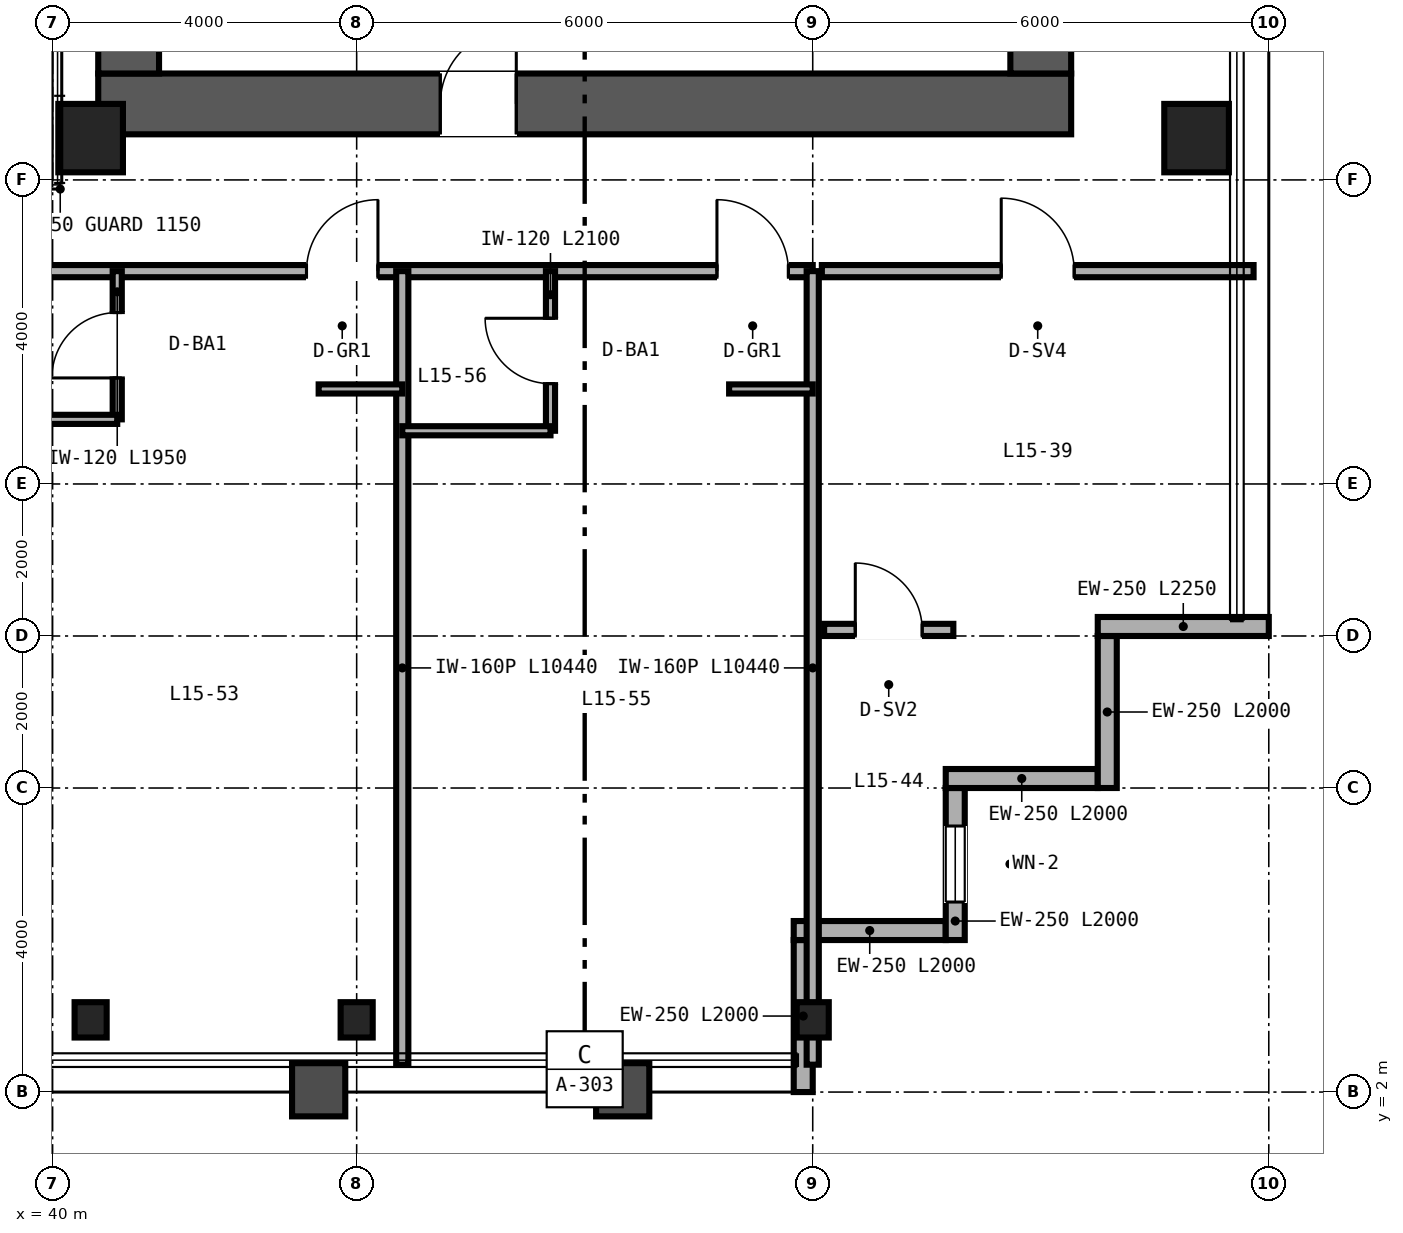
"""IFC4 building model, lengths in metres.
Left out: names, types, materials, properties, quantities, classifications, styles, units other than length and angle.
Written with IfcOpenShell. Run it as: python <this file> out.ifc"""

import sys

from ifc_helpers import new_model, si_unit, direction, frame, frame_2d, origin, origin_2d, place, context, subcontext, project, spatial, rectangle, hollow_rectangle, i_section, extrude, source, transform, mapped, element, fill, save


model = new_model("IFC4")
c1 = context("Model", 3, precision=1e-05, world=origin(), true_north=direction((0.0, 1.0)))
c2 = subcontext(c1, "Body", "Model", "MODEL_VIEW")
j1 = project(units=[si_unit("LENGTHUNIT", "METRE"), si_unit("PLANEANGLEUNIT", "RADIAN")], contexts=[c1])
p1 = place(None, origin())
s1 = spatial("IfcSite", under=j1, at=p1, CompositionType="ELEMENT")
p2 = place(p1, origin())
s2 = spatial("IfcBuilding", under=s1, at=p2, CompositionType="ELEMENT")
p3 = place(p2, frame((0.0, 0.0, 63.6)))
s3 = spatial("IfcBuildingStorey", under=s2, at=p3, CompositionType="ELEMENT", Elevation=63.6)
p4 = place(p3, frame((40.6, 15.0, 0.0), z_axis=(0.0, 0.0, 1.0), x_axis=(1.0, 0.0, 0.0)))
e1 = element("IfcWall", 1, at=p4, inside=s3, PredefinedType="SHEAR", context=c2, shape_type="SweptSolid", body=[
    extrude(rectangle(XDim=12.8, YDim=0.8, at=frame_2d((6.4, 0.0))), origin(), (0.0, 0.0, 1.0), 3.35),
])
p5 = place(p4, frame((4.5, 0.0, 0.0)))
e2 = element("IfcOpeningElement", 2, at=p5, cuts=e1, PredefinedType="OPENING", context=c2, shape_type="SweptSolid", body=[
    extrude(rectangle(XDim=1.0, YDim=2.15, at=frame_2d((0.5, 1.075))), frame((0.0, 0.41, 0.0), z_axis=(0.0, -1.0, 0.0), x_axis=(1.0, 0.0, 0.0)), (0.0, 0.0, 1.0), 0.82),
])
for number, where, z_axis, x_axis in (
    (3, (41.0, 15.4, 0.0), (0.0, 0.0, 1.0), (0.0, 1.0, 0.0)),
    (4, (53.0, 15.4, 0.0), (0.0, 0.0, 1.0), (0.0, 1.0, 0.0)),
):
    element("IfcWall", number, at=place(p3, frame(where, z_axis=z_axis, x_axis=x_axis)), inside=s3, PredefinedType="SHEAR", context=c2, shape_type="SweptSolid", body=[
        extrude(rectangle(XDim=21.2, YDim=0.8, at=frame_2d((10.6, 0.0))), origin(), (0.0, 0.0, 1.0), 3.35),
    ])
m1 = source(origin(), c2, "Body", "SweptSolid", [
    extrude(hollow_rectangle(XDim=0.85, YDim=0.9, WallThickness=0.04, at=origin_2d()), origin(), (0.0, 0.0, 1.0), 3.35),
])
for number, where, z_axis, x_axis in (
    (5, (40.5, 14.55, 0.0), (0.0, 0.0, 1.0), (1.0, 0.0, 0.0)),
    (6, (55.05, 14.55, 0.0), (0.0, 0.0, 1.0), (1.0, 0.0, 0.0)),
):
    element("IfcColumn", number, at=place(p3, frame(where, z_axis=z_axis, x_axis=x_axis)), inside=s3, PredefinedType="COLUMN", context=c2, shape_type="MappedRepresentation", body=[
        mapped(m1, transform((0.0, 0.0, 0.0), scale=1.0)),
    ])
m2 = source(origin(), c2, "Body", "SweptSolid", [
    extrude(i_section(OverallWidth=0.422, OverallDepth=0.465, WebThickness=0.045, FlangeThickness=0.073, FilletRadius=0.025, at=origin_2d()), origin(), (0.0, 0.0, 1.0), 3.35),
])
for number, where, z_axis, x_axis in (
    (7, (40.5, 2.95, 0.0), (0.0, 0.0, 1.0), (1.0, 0.0, 0.0)),
    (8, (44.0, 2.95, 0.0), (0.0, 0.0, 1.0), (1.0, 0.0, 0.0)),
    (9, (50.0, 2.95, 0.0), (0.0, 0.0, 1.0), (1.0, 0.0, 0.0)),
):
    element("IfcColumn", number, at=place(p3, frame(where, z_axis=z_axis, x_axis=x_axis)), inside=s3, PredefinedType="COLUMN", context=c2, shape_type="MappedRepresentation", body=[
        mapped(m2, transform((0.0, 0.0, 0.0), scale=1.0)),
    ])
p6 = place(p3, frame((49.875, 2.0, 0.0), z_axis=(0.0, 0.0, 1.0), x_axis=(0.0, 1.0, 0.0)))
e10 = element("IfcWall", 10, at=p6, inside=s3, PredefinedType="SOLIDWALL", context=c2, shape_type="SweptSolid", body=[
    extrude(rectangle(XDim=2.0, YDim=0.25, at=frame_2d((1.0, 0.0))), origin(), (0.0, 0.0, 1.0), 2.657),
])
p7 = place(p3, frame((49.75, 4.125, 0.0), z_axis=(0.0, 0.0, 1.0), x_axis=(1.0, 0.0, 0.0)))
e11 = element("IfcWall", 11, at=p7, inside=s3, PredefinedType="SOLIDWALL", context=c2, shape_type="SweptSolid", body=[
    extrude(rectangle(XDim=2.0, YDim=0.25, at=frame_2d((1.0, 0.0))), origin(), (0.0, 0.0, 1.0), 3.35),
])
p8 = place(p3, frame((51.875, 4.0, 0.0), z_axis=(0.0, 0.0, 1.0), x_axis=(0.0, 1.0, 0.0)))
e12 = element("IfcWall", 12, at=p8, inside=s3, PredefinedType="SOLIDWALL", context=c2, shape_type="SweptSolid", body=[
    extrude(rectangle(XDim=2.0, YDim=0.25, at=frame_2d((1.0, 0.0))), origin(), (0.0, 0.0, 1.0), 3.35),
])
p9 = place(p8, frame((0.5, 0.0, 0.85)))
e13 = element("IfcOpeningElement", 13, at=p9, cuts=e12, PredefinedType="OPENING", context=c2, shape_type="SweptSolid", body=[
    extrude(rectangle(XDim=1.0, YDim=1.9, at=frame_2d((0.5, 0.95))), frame((0.0, 0.135, 0.0), z_axis=(0.0, -1.0, 0.0), x_axis=(1.0, 0.0, 0.0)), (0.0, 0.0, 1.0), 0.27),
])
for number, where, z_axis, x_axis in (
    (14, (51.75, 6.125, 0.0), (0.0, 0.0, 1.0), (1.0, 0.0, 0.0)),
    (15, (53.875, 6.0, 0.0), (0.0, 0.0, 1.0), (0.0, 1.0, 0.0)),
):
    element("IfcWall", number, at=place(p3, frame(where, z_axis=z_axis, x_axis=x_axis)), inside=s3, PredefinedType="SOLIDWALL", context=c2, shape_type="SweptSolid", body=[
        extrude(rectangle(XDim=2.0, YDim=0.25, at=frame_2d((1.0, 0.0))), origin(), (0.0, 0.0, 1.0), 3.35),
    ])
p10 = place(p3, frame((53.75, 8.125, 0.0), z_axis=(0.0, 0.0, 1.0), x_axis=(1.0, 0.0, 0.0)))
e16 = element("IfcWall", 16, at=p10, inside=s3, PredefinedType="SOLIDWALL", context=c2, shape_type="SweptSolid", body=[
    extrude(rectangle(XDim=2.25, YDim=0.25, at=frame_2d((1.125, 0.0))), origin(), (0.0, 0.0, 1.0), 3.35),
])
p11 = place(p3, frame((50.12, 12.8, 0.0), z_axis=(0.0, 0.0, 1.0), x_axis=(1.0, 0.0, 0.0)))
e17 = element("IfcWall", 17, at=p11, inside=s3, PredefinedType="PARTITIONING", context=c2, shape_type="SweptSolid", body=[
    extrude(rectangle(XDim=5.68, YDim=0.16, at=frame_2d((2.84, 0.0))), origin(), (0.0, 0.0, 1.0), 3.35),
])
p12 = place(p11, frame((2.36, 0.0, 0.0)))
e18 = element("IfcOpeningElement", 18, at=p12, cuts=e17, PredefinedType="OPENING", context=c2, shape_type="SweptSolid", body=[
    extrude(rectangle(XDim=0.96, YDim=2.15, at=frame_2d((0.48, 1.075))), frame((0.0, 0.09, 0.0), z_axis=(0.0, -1.0, 0.0), x_axis=(1.0, 0.0, 0.0)), (0.0, 0.0, 1.0), 0.18),
])
p13 = place(p3, frame((50.15, 8.08, 0.0), z_axis=(0.0, 0.0, 1.0), x_axis=(1.0, 0.0, 0.0)))
e19 = element("IfcWall", 19, at=p13, inside=s3, PredefinedType="PARTITIONING", context=c2, shape_type="SweptSolid", body=[
    extrude(rectangle(XDim=1.7, YDim=0.16, at=frame_2d((0.85, 0.0))), origin(), (0.0, 0.0, 1.0), 3.35),
])
p14 = place(p13, frame((0.41, 0.0, 0.0)))
e20 = element("IfcOpeningElement", 20, at=p14, cuts=e19, PredefinedType="OPENING", context=c2, shape_type="SweptSolid", body=[
    extrude(rectangle(XDim=0.88, YDim=2.15, at=frame_2d((0.44, 1.075))), frame((0.0, 0.09, 0.0), z_axis=(0.0, -1.0, 0.0), x_axis=(1.0, 0.0, 0.0)), (0.0, 0.0, 1.0), 0.18),
])
p15 = place(p3, frame((14.0, 12.8, 0.0), z_axis=(0.0, 0.0, 1.0), x_axis=(1.0, 0.0, 0.0)))
e21 = element("IfcWall", 21, at=p15, inside=s3, PredefinedType="PARTITIONING", context=c2, shape_type="SweptSolid", body=[
    extrude(rectangle(XDim=36.0, YDim=0.16, at=frame_2d((18.0, 0.0))), origin(), (0.0, 0.0, 1.0), 2.571),
])
p16 = place(p15, frame((7.1, 0.0, 0.0)))
e22 = element("IfcOpeningElement", 22, at=p16, cuts=e21, PredefinedType="OPENING", context=c2, shape_type="SweptSolid", body=[
    extrude(rectangle(XDim=0.98, YDim=2.2, at=frame_2d((0.49, 1.1))), frame((0.0, 0.09, 0.0), z_axis=(0.0, -1.0, 0.0), x_axis=(1.0, 0.0, 0.0)), (0.0, 0.0, 1.0), 0.18),
])
p17 = place(p15, frame((15.5, 0.0, 0.0)))
e23 = element("IfcOpeningElement", 23, at=p17, cuts=e21, PredefinedType="OPENING", context=c2, shape_type="SweptSolid", body=[
    extrude(rectangle(XDim=0.98, YDim=2.2, at=frame_2d((0.49, 1.1))), frame((0.0, 0.09, 0.0), z_axis=(0.0, -1.0, 0.0), x_axis=(1.0, 0.0, 0.0)), (0.0, 0.0, 1.0), 0.18),
])
p18 = place(p15, frame((23.9, 0.0, 0.0)))
e24 = element("IfcOpeningElement", 24, at=p18, cuts=e21, PredefinedType="OPENING", context=c2, shape_type="SweptSolid", body=[
    extrude(rectangle(XDim=0.98, YDim=2.2, at=frame_2d((0.49, 1.1))), frame((0.0, 0.09, 0.0), z_axis=(0.0, -1.0, 0.0), x_axis=(1.0, 0.0, 0.0)), (0.0, 0.0, 1.0), 0.18),
])
p19 = place(p15, frame((29.34, 0.0, 0.0)))
e25 = element("IfcOpeningElement", 25, at=p19, cuts=e21, PredefinedType="OPENING", context=c2, shape_type="SweptSolid", body=[
    extrude(rectangle(XDim=0.94, YDim=2.15, at=frame_2d((0.47, 1.075))), frame((0.0, 0.09, 0.0), z_axis=(0.0, -1.0, 0.0), x_axis=(1.0, 0.0, 0.0)), (0.0, 0.0, 1.0), 0.18),
])
p20 = place(p15, frame((34.74, 0.0, 0.0)))
e26 = element("IfcOpeningElement", 26, at=p20, cuts=e21, PredefinedType="OPENING", context=c2, shape_type="SweptSolid", body=[
    extrude(rectangle(XDim=0.94, YDim=2.15, at=frame_2d((0.47, 1.075))), frame((0.0, 0.09, 0.0), z_axis=(0.0, -1.0, 0.0), x_axis=(1.0, 0.0, 0.0)), (0.0, 0.0, 1.0), 0.18),
])
for number, where, z_axis, x_axis in (
    (27, (50.0, 2.36, 0.0), (0.0, 0.0, 1.0), (0.0, 1.0, 0.0)),
    (28, (44.6, 2.36, 0.0), (0.0, 0.0, 1.0), (0.0, 1.0, 0.0)),
):
    element("IfcWall", number, at=place(p3, frame(where, z_axis=z_axis, x_axis=x_axis)), inside=s3, PredefinedType="PARTITIONING", context=c2, shape_type="SweptSolid", body=[
        extrude(rectangle(XDim=10.44, YDim=0.16, at=frame_2d((5.22, 0.0))), origin(), (0.0, 0.0, 1.0), 2.657),
    ])
p21 = place(p3, frame((40.85, 10.85, 0.0), z_axis=(0.0, 0.0, 1.0), x_axis=(0.0, 1.0, 0.0)))
e29 = element("IfcWall", 29, at=p21, inside=s3, PredefinedType="PARTITIONING", context=c2, shape_type="SweptSolid", body=[
    extrude(rectangle(XDim=1.95, YDim=0.12, at=frame_2d((0.975, 0.0))), origin(), (0.0, 0.0, 1.0), 3.35),
])
p22 = place(p21, frame((0.545, 0.0, 0.0)))
e30 = element("IfcOpeningElement", 30, at=p22, cuts=e29, PredefinedType="OPENING", context=c2, shape_type="SweptSolid", body=[
    extrude(rectangle(XDim=0.86, YDim=2.1, at=frame_2d((0.43, 1.05))), frame((0.0, 0.07, 0.0), z_axis=(0.0, -1.0, 0.0), x_axis=(1.0, 0.0, 0.0)), (0.0, 0.0, 1.0), 0.14),
])
p23 = place(p3, frame((39.2, 10.85, 0.0), z_axis=(0.0, 0.0, 1.0), x_axis=(1.0, 0.0, 0.0)))
e31 = element("IfcWall", 31, at=p23, inside=s3, PredefinedType="PARTITIONING", context=c2, shape_type="SweptSolid", body=[
    extrude(rectangle(XDim=1.65, YDim=0.12, at=frame_2d((0.825, 0.0))), origin(), (0.0, 0.0, 1.0), 2.571),
])
p24 = place(p3, frame((43.5, 11.25, 0.0), z_axis=(0.0, 0.0, 1.0), x_axis=(1.0, 0.0, 0.0)))
e32 = element("IfcWall", 32, at=p24, inside=s3, PredefinedType="PARTITIONING", context=c2, shape_type="SweptSolid", body=[
    extrude(rectangle(XDim=1.1, YDim=0.12, at=frame_2d((0.55, 0.0))), origin(), (0.0, 0.0, 1.0), 3.35),
])
p25 = place(p3, frame((46.55, 10.7, 0.0), z_axis=(0.0, 0.0, 1.0), x_axis=(0.0, 1.0, 0.0)))
e33 = element("IfcWall", 33, at=p25, inside=s3, PredefinedType="PARTITIONING", context=c2, shape_type="SweptSolid", body=[
    extrude(rectangle(XDim=2.1, YDim=0.12, at=frame_2d((1.05, 0.0))), origin(), (0.0, 0.0, 1.0), 3.35),
])
p26 = place(p25, frame((0.62, 0.0, 0.0)))
e34 = element("IfcOpeningElement", 34, at=p26, cuts=e33, PredefinedType="OPENING", context=c2, shape_type="SweptSolid", body=[
    extrude(rectangle(XDim=0.86, YDim=2.1, at=frame_2d((0.43, 1.05))), frame((0.0, 0.07, 0.0), z_axis=(0.0, -1.0, 0.0), x_axis=(1.0, 0.0, 0.0)), (0.0, 0.0, 1.0), 0.14),
])
p27 = place(p3, frame((44.6, 10.7, 0.0), z_axis=(0.0, 0.0, 1.0), x_axis=(1.0, 0.0, 0.0)))
e35 = element("IfcWall", 35, at=p27, inside=s3, PredefinedType="PARTITIONING", context=c2, shape_type="SweptSolid", body=[
    extrude(rectangle(XDim=1.95, YDim=0.12, at=frame_2d((0.975, 0.0))), origin(), (0.0, 0.0, 1.0), 3.35),
])
p28 = place(p3, frame((48.9, 11.25, 0.0), z_axis=(0.0, 0.0, 1.0), x_axis=(1.0, 0.0, 0.0)))
e36 = element("IfcWall", 36, at=p28, inside=s3, PredefinedType="PARTITIONING", context=c2, shape_type="SweptSolid", body=[
    extrude(rectangle(XDim=1.1, YDim=0.12, at=frame_2d((0.55, 0.0))), origin(), (0.0, 0.0, 1.0), 3.35),
])
m3 = source(origin(), c2, "Body", "SweptSolid", [
    extrude(rectangle(XDim=1.0, YDim=1.9, at=frame_2d((0.5, 0.95))), frame((0.0, 0.03, 0.0), z_axis=(0.0, -1.0, 0.0), x_axis=(1.0, 0.0, 0.0)), (0.0, 0.0, 1.0), 0.06),
])
p29 = place(p9, origin())
e37 = element("IfcWindow", 37, at=p29, inside=s3, PartitioningType="SINGLE_PANEL", PredefinedType="WINDOW", context=c2, shape_type="MappedRepresentation", body=[
    mapped(m3, transform((0.0, 0.0, 0.0), scale=1.0)),
])
fill(e13, e37)
m4 = source(origin(), c2, "Body", "SweptSolid", [
    extrude(rectangle(XDim=1.0, YDim=2.15, at=frame_2d((0.5, 1.075))), frame((0.0, 0.025, 0.0), z_axis=(0.0, -1.0, 0.0), x_axis=(1.0, 0.0, 0.0)), (0.0, 0.0, 1.0), 0.05),
])
p30 = place(p5, origin())
e38 = element("IfcDoor", 38, at=p30, inside=s3, OperationType="SINGLE_SWING_RIGHT", PredefinedType="DOOR", context=c2, shape_type="MappedRepresentation", body=[
    mapped(m4, transform((0.0, 0.0, 0.0), scale=1.0)),
])
fill(e2, e38)
m5 = source(origin(), c2, "Body", "SweptSolid", [
    extrude(rectangle(XDim=0.96, YDim=2.15, at=frame_2d((0.48, 1.075))), frame((0.0, 0.025, 0.0), z_axis=(0.0, -1.0, 0.0), x_axis=(1.0, 0.0, 0.0)), (0.0, 0.0, 1.0), 0.05),
])
p31 = place(p12, origin())
e39 = element("IfcDoor", 39, at=p31, inside=s3, OperationType="SINGLE_SWING_LEFT", PredefinedType="DOOR", context=c2, shape_type="MappedRepresentation", body=[
    mapped(m5, transform((0.0, 0.0, 0.0), scale=1.0)),
])
fill(e18, e39)
m6 = source(origin(), c2, "Body", "SweptSolid", [
    extrude(rectangle(XDim=0.88, YDim=2.15, at=frame_2d((0.44, 1.075))), frame((0.0, 0.025, 0.0), z_axis=(0.0, -1.0, 0.0), x_axis=(1.0, 0.0, 0.0)), (0.0, 0.0, 1.0), 0.05),
])
p32 = place(p14, origin())
e40 = element("IfcDoor", 40, at=p32, inside=s3, OperationType="SINGLE_SWING_LEFT", PredefinedType="DOOR", context=c2, shape_type="MappedRepresentation", body=[
    mapped(m6, transform((0.0, 0.0, 0.0), scale=1.0)),
])
fill(e20, e40)
m7 = source(origin(), c2, "Body", "SweptSolid", [
    extrude(rectangle(XDim=0.86, YDim=2.1, at=frame_2d((0.43, 1.05))), frame((0.0, 0.025, 0.0), z_axis=(0.0, -1.0, 0.0), x_axis=(1.0, 0.0, 0.0)), (0.0, 0.0, 1.0), 0.05),
])
p33 = place(p22, origin())
e41 = element("IfcDoor", 41, at=p33, inside=s3, OperationType="SINGLE_SWING_LEFT", PredefinedType="DOOR", context=c2, shape_type="MappedRepresentation", body=[
    mapped(m7, transform((0.0, 0.0, 0.0), scale=1.0)),
])
fill(e30, e41)
p34 = place(p26, origin())
e42 = element("IfcDoor", 42, at=p34, inside=s3, OperationType="SINGLE_SWING_RIGHT", PredefinedType="DOOR", context=c2, shape_type="MappedRepresentation", body=[
    mapped(m7, transform((0.0, 0.0, 0.0), scale=1.0)),
])
fill(e34, e42)
m8 = source(origin(), c2, "Body", "SweptSolid", [
    extrude(rectangle(XDim=0.94, YDim=2.15, at=frame_2d((0.47, 1.075))), frame((0.0, 0.025, 0.0), z_axis=(0.0, -1.0, 0.0), x_axis=(1.0, 0.0, 0.0)), (0.0, 0.0, 1.0), 0.05),
])
p35 = place(p19, origin())
e43 = element("IfcDoor", 43, at=p35, inside=s3, OperationType="SINGLE_SWING_RIGHT", PredefinedType="DOOR", context=c2, shape_type="MappedRepresentation", body=[
    mapped(m8, transform((0.0, 0.0, 0.0), scale=1.0)),
])
fill(e25, e43)
p36 = place(p20, origin())
e44 = element("IfcDoor", 44, at=p36, inside=s3, OperationType="SINGLE_SWING_LEFT", PredefinedType="DOOR", context=c2, shape_type="MappedRepresentation", body=[
    mapped(m8, transform((0.0, 0.0, 0.0), scale=1.0)),
])
fill(e26, e44)
save(model, sys.argv[1])
